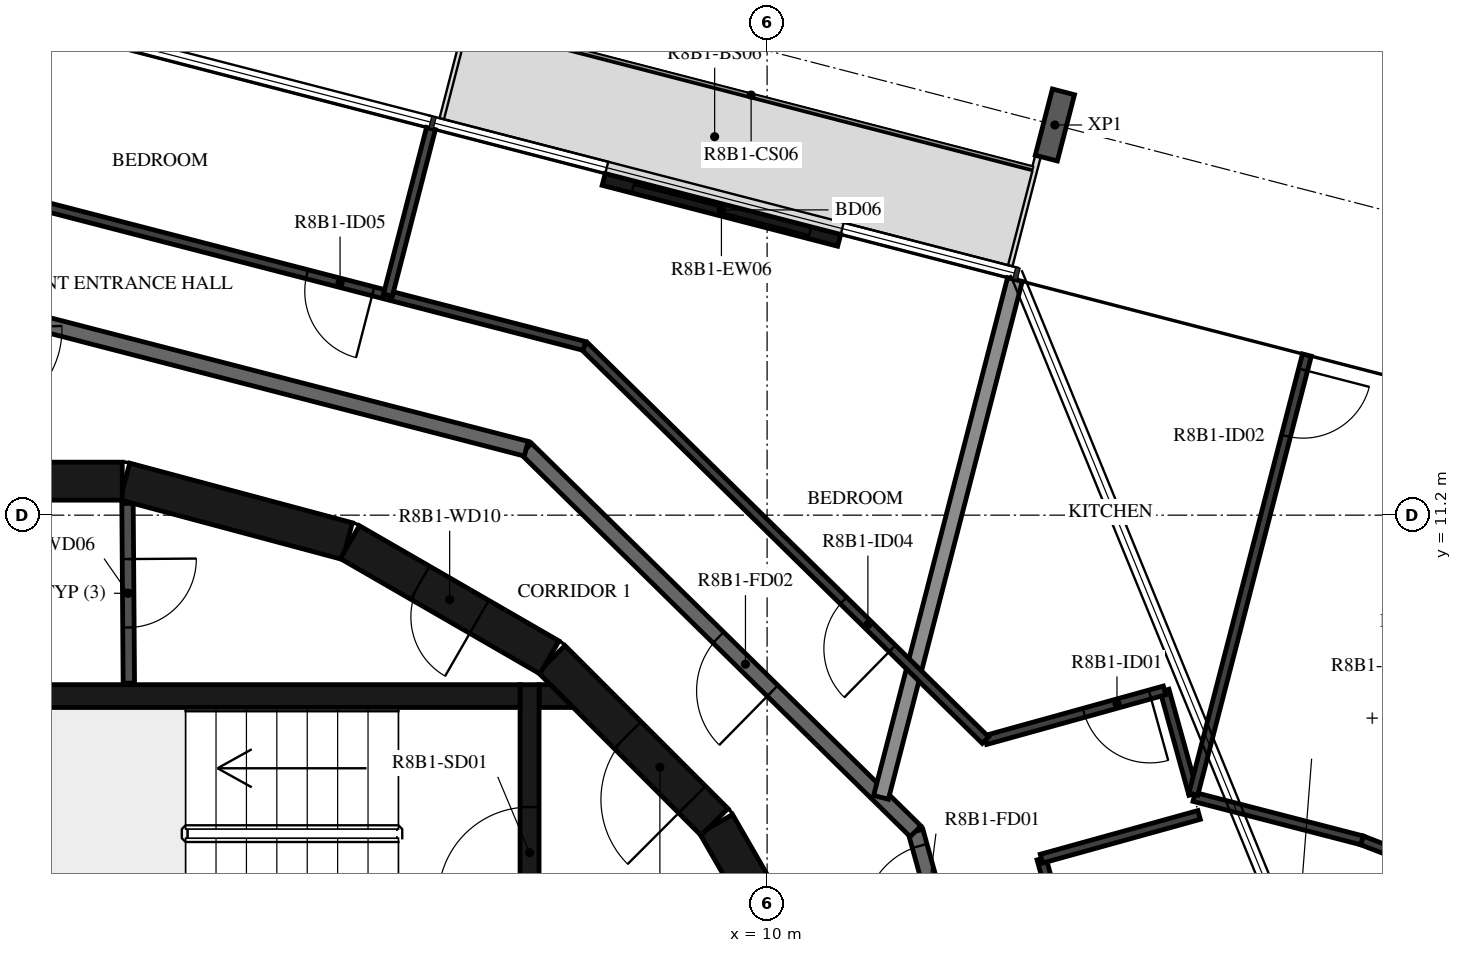
"""IFC4 building model, lengths in metres.
Left out: names, types, materials, properties, quantities, classifications, styles, units other than length and angle.
Written with IfcOpenShell. Run it as: python <this file> out.ifc"""

import sys

from ifc_helpers import new_model, si_unit, direction, frame, frame_2d, origin, origin_2d, place, context, subcontext, project, spatial, polyline, rectangle, i_section, outline, extrude, element, fill, save


model = new_model("IFC4")
c1 = context("Model", 3, precision=1e-05, world=origin(), true_north=direction((0.0, 1.0)))
c2 = subcontext(c1, "Body", "Model", "MODEL_VIEW")
j1 = project(units=[si_unit("LENGTHUNIT", "METRE"), si_unit("PLANEANGLEUNIT", "RADIAN")], contexts=[c1])
p1 = place(None, origin())
s1 = spatial("IfcSite", under=j1, at=p1, CompositionType="ELEMENT")
p2 = place(p1, origin())
s2 = spatial("IfcBuilding", under=s1, at=p2, CompositionType="ELEMENT")
p3 = place(p2, frame((0.0, 0.0, 308.7)))
s3 = spatial("IfcBuildingStorey", under=s2, at=p3, CompositionType="ELEMENT", Elevation=308.7)
p4 = place(p3, frame((13.786, 16.333, -0.38), z_axis=(0.0, 0.0, 1.0), x_axis=(0.968147663906, -0.250379913079, 0.0)))
e1 = element("IfcColumn", 1, at=p4, inside=s3, PredefinedType="COLUMN", context=c2, shape_type="SweptSolid", body=[
    extrude(i_section(OverallWidth=0.3, OverallDepth=0.9, WebThickness=0.019, FlangeThickness=0.035, FilletRadius=0.03, at=origin_2d()), origin(), (0.0, 0.0, 1.0), 3.5),
])
p5 = place(p3, frame((10.948, 14.815, 0.0), z_axis=(0.0, 0.0, 1.0), x_axis=(-0.968144998439, 0.250390219454, 0.0)))
e2 = element("IfcWall", 2, at=p5, inside=s3, PredefinedType="STANDARD", context=c2, shape_type="SweptSolid", body=[
    extrude(rectangle(XDim=3.2, YDim=0.16, at=frame_2d((1.6, 0.0))), origin(), (0.0, 0.0, 1.0), 3.12),
])
p6 = place(p5, frame((0.4, 0.0, 0.0)))
e3 = element("IfcOpeningElement", 3, at=p6, cuts=e2, PredefinedType="OPENING", context=c2, shape_type="SweptSolid", body=[
    extrude(rectangle(XDim=2.4, YDim=2.4, at=frame_2d((1.2, 1.2))), frame((0.0, 0.09, 0.0), z_axis=(0.0, -1.0, 0.0), x_axis=(1.0, 0.0, 0.0)), (0.0, 0.0, 1.0), 0.18),
])
p7 = place(p3, frame((10.845, 4.51, 0.0), z_axis=(0.0, 0.0, 1.0), x_axis=(-0.500087131594, 0.865975092491, 0.0)))
e4 = element("IfcWall", 4, at=p7, inside=s3, PredefinedType="SHEAR", context=c2, shape_type="SweptSolid", body=[
    extrude(rectangle(XDim=3.033, YDim=0.5, at=frame_2d((1.516, 0.0))), origin(), (0.0, 0.0, 1.0), 3.12),
])
p8 = place(p3, frame((9.308, 7.164, 0.0), z_axis=(0.0, 0.0, 1.0), x_axis=(-0.707106781187, 0.707106781187, 0.0)))
e5 = element("IfcWall", 5, at=p8, inside=s3, PredefinedType="SHEAR", context=c2, shape_type="SweptSolid", body=[
    extrude(rectangle(XDim=3.032, YDim=0.5, at=frame_2d((1.516, 0.0))), origin(), (0.0, 0.0, 1.0), 3.12),
])
p9 = place(p8, frame((0.416, 0.0, 0.0)))
e6 = element("IfcOpeningElement", 6, at=p9, cuts=e5, PredefinedType="OPENING", context=c2, shape_type="SweptSolid", body=[
    extrude(rectangle(XDim=1.2, YDim=2.1, at=frame_2d((0.6, 1.05))), frame((0.0, 0.26, 0.0), z_axis=(0.0, -1.0, 0.0), x_axis=(1.0, 0.0, 0.0)), (0.0, 0.0, 1.0), 0.52),
])
p10 = place(p3, frame((7.137, 9.329, 0.0), z_axis=(0.0, 0.0, 1.0), x_axis=(-0.865975092491, 0.500087131594, 0.0)))
e7 = element("IfcWall", 7, at=p10, inside=s3, PredefinedType="SHEAR", context=c2, shape_type="SweptSolid", body=[
    extrude(rectangle(XDim=3.033, YDim=0.5, at=frame_2d((1.516, 0.0))), origin(), (0.0, 0.0, 1.0), 3.12),
])
p11 = place(p10, frame((1.066, 0.0, 0.0)))
e8 = element("IfcOpeningElement", 8, at=p11, cuts=e7, PredefinedType="OPENING", context=c2, shape_type="SweptSolid", body=[
    extrude(rectangle(XDim=0.9, YDim=2.1, at=frame_2d((0.45, 1.05))), frame((0.0, 0.26, 0.0), z_axis=(0.0, -1.0, 0.0), x_axis=(1.0, 0.0, 0.0)), (0.0, 0.0, 1.0), 0.52),
])
for number, where, z_axis, x_axis in (
    (9, (4.479, 10.858, 0.0), (0.0, 0.0, 1.0), (-0.966, 0.259, 0.0)),
    (10, (1.516, 11.647, 0.0), (0.0, 0.0, 1.0), (-1.0, 0.0, 0.0)),
):
    element("IfcWall", number, at=place(p3, frame(where, z_axis=z_axis, x_axis=x_axis)), inside=s3, PredefinedType="SHEAR", context=c2, shape_type="SweptSolid", body=[
        extrude(rectangle(XDim=3.033, YDim=0.5, at=frame_2d((1.516, 0.0))), origin(), (0.0, 0.0, 1.0), 3.12),
    ])
p12 = place(p3, frame((0.0, 8.82, 0.0), z_axis=(0.0, 0.0, 1.0), x_axis=(1.0, 0.0, 0.0)))
e11 = element("IfcWall", 11, at=p12, inside=s3, PredefinedType="SHEAR", context=c2, shape_type="SweptSolid", body=[
    extrude(rectangle(XDim=6.75, YDim=0.3, at=frame_2d((3.375, 0.0))), origin(), (0.0, 0.0, 1.0), 3.12),
])
p13 = place(p3, frame((6.875, 5.05, 0.0), z_axis=(0.0, 0.0, 1.0), x_axis=(0.0, 1.0, 0.0)))
e12 = element("IfcWall", 12, at=p13, inside=s3, PredefinedType="SHEAR", context=c2, shape_type="SweptSolid", body=[
    extrude(rectangle(XDim=3.92, YDim=0.25, at=frame_2d((1.96, 0.0))), origin(), (0.0, 0.0, 1.0), 3.12),
])
p14 = place(p13, frame((1.11, 0.0, 0.0)))
e13 = element("IfcOpeningElement", 13, at=p14, cuts=e12, PredefinedType="OPENING", context=c2, shape_type="SweptSolid", body=[
    extrude(rectangle(XDim=1.2, YDim=2.1, at=frame_2d((0.6, 1.05))), frame((0.0, 0.135, 0.0), z_axis=(0.0, -1.0, 0.0), x_axis=(1.0, 0.0, 0.0)), (0.0, 0.0, 1.0), 0.27),
])
p15 = place(p3, origin())
e14 = element("IfcWall", 14, at=p15, inside=s3, PredefinedType="SHEAR", context=c2, shape_type="SweptSolid", body=[
    extrude(outline(polyline([(7.448, 8.67), (7.0, 8.67), (7.0, 8.97), (7.148, 8.97), (7.448, 8.67)])), origin(), (0.0, 0.0, 1.0), 3.12),
])
p16 = place(p3, frame((1.586, 11.354, 0.0), z_axis=(0.0, 0.0, 1.0), x_axis=(0.007227482881, -0.999973881405, 0.0)))
e15 = element("IfcWall", 15, at=p16, inside=s3, PredefinedType="PARTITIONING", context=c2, shape_type="SweptSolid", body=[
    extrude(rectangle(XDim=2.365, YDim=0.15, at=frame_2d((1.182, 0.0))), origin(), (0.0, 0.0, 1.0), 3.12),
])
p17 = place(p16, frame((0.732, 0.0, 0.0)))
e16 = element("IfcOpeningElement", 16, at=p17, cuts=e15, PredefinedType="OPENING", context=c2, shape_type="SweptSolid", body=[
    extrude(rectangle(XDim=0.9, YDim=2.1, at=frame_2d((0.45, 1.05))), frame((0.0, 0.085, 0.0), z_axis=(0.0, -1.0, 0.0), x_axis=(1.0, 0.0, 0.0)), (0.0, 0.0, 1.0), 0.17),
])
p18 = place(p3, frame((12.913, 3.581, 0.0), z_axis=(0.0, 0.0, 1.0), x_axis=(-0.267223005422, 0.963634715737, 0.0)))
e17 = element("IfcWall", 17, at=p18, inside=s3, PredefinedType="STANDARD", context=c2, shape_type="SweptSolid", body=[
    extrude(rectangle(XDim=3.591, YDim=0.2, at=frame_2d((1.795, 0.0))), origin(), (0.0, 0.0, 1.0), 3.12),
])
p19 = place(p18, frame((2.39, 0.0, 0.0)))
e18 = element("IfcOpeningElement", 18, at=p19, cuts=e17, PredefinedType="OPENING", context=c2, shape_type="SweptSolid", body=[
    extrude(rectangle(XDim=1.0, YDim=2.1, at=frame_2d((0.5, 1.05))), frame((0.0, 0.11, 0.0), z_axis=(0.0, -1.0, 0.0), x_axis=(1.0, 0.0, 0.0)), (0.0, 0.0, 1.0), 0.22),
])
p20 = place(p3, frame((11.953, 7.041, 0.0), z_axis=(0.0, 0.0, 1.0), x_axis=(-0.713250549143, 0.70090916255, 0.0)))
e19 = element("IfcWall", 19, at=p20, inside=s3, PredefinedType="STANDARD", context=c2, shape_type="SweptSolid", body=[
    extrude(rectangle(XDim=7.181, YDim=0.2, at=frame_2d((3.59, 0.0))), origin(), (0.0, 0.0, 1.0), 3.12),
])
p21 = place(p20, frame((2.637, 0.0, 0.0)))
e20 = element("IfcOpeningElement", 20, at=p21, cuts=e19, PredefinedType="OPENING", context=c2, shape_type="SweptSolid", body=[
    extrude(rectangle(XDim=1.0, YDim=2.1, at=frame_2d((0.5, 1.05))), frame((0.0, 0.11, 0.0), z_axis=(0.0, -1.0, 0.0), x_axis=(1.0, 0.0, 0.0)), (0.0, 0.0, 1.0), 0.22),
])
p22 = place(p3, frame((6.831, 12.074, 0.0), z_axis=(0.0, 0.0, 1.0), x_axis=(-0.968144780225, 0.250391063186, 0.0)))
e21 = element("IfcWall", 21, at=p22, inside=s3, PredefinedType="STANDARD", context=c2, shape_type="SweptSolid", body=[
    extrude(rectangle(XDim=7.181, YDim=0.2, at=frame_2d((3.591, 0.0))), origin(), (0.0, 0.0, 1.0), 3.12),
])
p23 = place(p3, frame((13.26, 14.3, 0.0), z_axis=(0.0, 0.0, 1.0), x_axis=(-0.250397400042, -0.968143141303, 0.0)))
e22 = element("IfcWall", 22, at=p23, inside=s3, PredefinedType="STANDARD", context=c2, shape_type="SweptSolid", body=[
    extrude(rectangle(XDim=7.037, YDim=0.2, at=frame_2d((3.518, 0.0))), origin(), (0.0, 0.0, 1.0), 2.73),
])
p24 = place(p3, frame((14.358, 3.982, 0.0), z_axis=(0.0, 0.0, 1.0), x_axis=(-0.267275166053, 0.963620249689, 0.0)))
e23 = element("IfcWall", 23, at=p24, inside=s3, PredefinedType="PARTITIONING", context=c2, shape_type="SweptSolid", body=[
    extrude(rectangle(XDim=2.801, YDim=0.12, at=frame_2d((1.4, 0.0))), origin(), (0.0, 0.0, 1.0), 3.12),
])
p25 = place(p24, frame((0.2, 0.0, 0.0)))
e24 = element("IfcOpeningElement", 24, at=p25, cuts=e23, PredefinedType="OPENING", context=c2, shape_type="SweptSolid", body=[
    extrude(rectangle(XDim=0.8, YDim=2.1, at=frame_2d((0.4, 1.05))), frame((0.0, 0.07, 0.0), z_axis=(0.0, -1.0, 0.0), x_axis=(1.0, 0.0, 0.0)), (0.0, 0.0, 1.0), 0.14),
])
p26 = place(p3, frame((13.61, 6.681, 0.0), z_axis=(0.0, 0.0, 1.0), x_axis=(0.963626714087, 0.267251858551, 0.0)))
e25 = element("IfcWall", 25, at=p26, inside=s3, PredefinedType="PARTITIONING", context=c2, shape_type="SweptSolid", body=[
    extrude(rectangle(XDim=2.152, YDim=0.12, at=frame_2d((1.076, 0.0))), origin(), (0.0, 0.0, 1.0), 3.12),
])
p27 = place(p3, frame((15.608, 7.53, 0.0), z_axis=(0.0, 0.0, 1.0), x_axis=(-0.267172351994, 0.963648760872, 0.0)))
e26 = element("IfcWall", 26, at=p27, inside=s3, PredefinedType="PARTITIONING", context=c2, shape_type="SweptSolid", body=[
    extrude(rectangle(XDim=1.416, YDim=0.12, at=frame_2d((0.708, 0.0))), origin(), (0.0, 0.0, 1.0), 3.12),
])
p28 = place(p3, frame((15.229, 8.894, 0.0), z_axis=(0.0, 0.0, 1.0), x_axis=(-0.96363793677, -0.267211389759, 0.0)))
e27 = element("IfcWall", 27, at=p28, inside=s3, PredefinedType="PARTITIONING", context=c2, shape_type="SweptSolid", body=[
    extrude(rectangle(XDim=2.446, YDim=0.12, at=frame_2d((1.223, 0.0))), origin(), (0.0, 0.0, 1.0), 3.12),
])
p29 = place(p28, frame((0.2, 0.0, 0.0)))
e28 = element("IfcOpeningElement", 28, at=p29, cuts=e27, PredefinedType="OPENING", context=c2, shape_type="SweptSolid", body=[
    extrude(rectangle(XDim=0.9, YDim=2.1, at=frame_2d((0.45, 1.05))), frame((0.0, 0.07, 0.0), z_axis=(0.0, -1.0, 0.0), x_axis=(1.0, 0.0, 0.0)), (0.0, 0.0, 1.0), 0.14),
])
p30 = place(p3, frame((12.873, 8.24, 0.0), z_axis=(0.0, 0.0, 1.0), x_axis=(-0.713251042219, 0.700908660792, 0.0)))
e29 = element("IfcWall", 29, at=p30, inside=s3, PredefinedType="PARTITIONING", context=c2, shape_type="SweptSolid", body=[
    extrude(rectangle(XDim=7.398, YDim=0.12, at=frame_2d((3.699, 0.0))), origin(), (0.0, 0.0, 1.0), 3.12),
])
p31 = place(p30, frame((1.718, 0.0, 0.0)))
e30 = element("IfcOpeningElement", 30, at=p31, cuts=e29, PredefinedType="OPENING", context=c2, shape_type="SweptSolid", body=[
    extrude(rectangle(XDim=0.9, YDim=2.1, at=frame_2d((0.45, 1.05))), frame((0.0, 0.07, 0.0), z_axis=(0.0, -1.0, 0.0), x_axis=(1.0, 0.0, 0.0)), (0.0, 0.0, 1.0), 0.14),
])
p32 = place(p3, frame((18.577, 6.631, 0.0), z_axis=(0.0, 0.0, 1.0), x_axis=(-0.932531937323, 0.361087504455, 0.0)))
e31 = element("IfcWall", 31, at=p32, inside=s3, PredefinedType="PARTITIONING", context=c2, shape_type="SweptSolid", body=[
    extrude(rectangle(XDim=0.807, YDim=0.12, at=frame_2d((0.403, 0.0))), origin(), (0.0, 0.0, 1.0), 3.12),
])
p33 = place(p3, frame((17.825, 6.922, 0.0), z_axis=(0.0, 0.0, 1.0), x_axis=(-0.968151834511, 0.250363785985, 0.0)))
e32 = element("IfcWall", 32, at=p33, inside=s3, PredefinedType="PARTITIONING", context=c2, shape_type="SweptSolid", body=[
    extrude(rectangle(XDim=2.28, YDim=0.12, at=frame_2d((1.14, 0.0))), origin(), (0.0, 0.0, 1.0), 3.12),
])
p34 = place(p3, frame((17.102, 13.307, 0.0), z_axis=(0.0, 0.0, 1.0), x_axis=(-0.250374225748, -0.968149134731, 0.0)))
e33 = element("IfcWall", 33, at=p34, inside=s3, PredefinedType="PARTITIONING", context=c2, shape_type="SweptSolid", body=[
    extrude(rectangle(XDim=5.967, YDim=0.12, at=frame_2d((2.983, 0.0))), origin(), (0.0, 0.0, 1.0), 3.12),
])
p35 = place(p34, frame((0.2, 0.0, 0.0)))
e34 = element("IfcOpeningElement", 34, at=p35, cuts=e33, PredefinedType="OPENING", context=c2, shape_type="SweptSolid", body=[
    extrude(rectangle(XDim=0.9, YDim=2.1, at=frame_2d((0.45, 1.05))), frame((0.0, 0.07, 0.0), z_axis=(0.0, -1.0, 0.0), x_axis=(1.0, 0.0, 0.0)), (0.0, 0.0, 1.0), 0.14),
])
p36 = place(p3, frame((7.596, 13.426, 0.0), z_axis=(0.0, 0.0, 1.0), x_axis=(-0.968146656033, 0.250383810203, 0.0)))
e35 = element("IfcWall", 35, at=p36, inside=s3, PredefinedType="PARTITIONING", context=c2, shape_type="SweptSolid", body=[
    extrude(rectangle(XDim=7.985, YDim=0.12, at=frame_2d((3.992, 0.0))), origin(), (0.0, 0.0, 1.0), 3.12),
])
p37 = place(p36, frame((2.87, 0.0, 0.0)))
e36 = element("IfcOpeningElement", 36, at=p37, cuts=e35, PredefinedType="OPENING", context=c2, shape_type="SweptSolid", body=[
    extrude(rectangle(XDim=0.9, YDim=2.1, at=frame_2d((0.45, 1.05))), frame((0.0, 0.07, 0.0), z_axis=(0.0, -1.0, 0.0), x_axis=(1.0, 0.0, 0.0)), (0.0, 0.0, 1.0), 0.14),
])
p38 = place(p3, frame((5.578, 16.287, 0.0), z_axis=(0.0, 0.0, 1.0), x_axis=(-0.250415921279, -0.968138350841, 0.0)))
e37 = element("IfcWall", 37, at=p38, inside=s3, PredefinedType="PARTITIONING", context=c2, shape_type="SweptSolid", body=[
    extrude(rectangle(XDim=2.265, YDim=0.12, at=frame_2d((1.132, 0.0))), origin(), (0.0, 0.0, 1.0), 2.73),
])
p39 = place(p6, origin())
e38 = element("IfcDoor", 38, at=p39, inside=s3, OperationType="DOUBLE_DOOR_SLIDING", PredefinedType="DOOR", context=c2, shape_type="SweptSolid", body=[
    extrude(rectangle(XDim=2.4, YDim=2.4, at=frame_2d((1.2, 1.2))), frame((0.0, 0.025, 0.0), z_axis=(0.0, -1.0, 0.0), x_axis=(1.0, 0.0, 0.0)), (0.0, 0.0, 1.0), 0.05),
])
fill(e3, e38)
p40 = place(p14, origin())
e39 = element("IfcDoor", 39, at=p40, inside=s3, OperationType="SINGLE_SWING_LEFT", PredefinedType="DOOR", context=c2, shape_type="SweptSolid", body=[
    extrude(rectangle(XDim=1.2, YDim=2.1, at=frame_2d((0.6, 1.05))), frame((0.0, 0.025, 0.0), z_axis=(0.0, -1.0, 0.0), x_axis=(1.0, 0.0, 0.0)), (0.0, 0.0, 1.0), 0.05),
])
fill(e13, e39)
p41 = place(p9, origin())
e40 = element("IfcDoor", 40, at=p41, inside=s3, OperationType="SINGLE_SWING_RIGHT", PredefinedType="DOOR", context=c2, shape_type="SweptSolid", body=[
    extrude(rectangle(XDim=1.2, YDim=2.1, at=frame_2d((0.6, 1.05))), frame((0.0, 0.025, 0.0), z_axis=(0.0, -1.0, 0.0), x_axis=(1.0, 0.0, 0.0)), (0.0, 0.0, 1.0), 0.05),
])
fill(e6, e40)
p42 = place(p17, origin())
e41 = element("IfcDoor", 41, at=p42, inside=s3, OperationType="SINGLE_SWING_RIGHT", PredefinedType="DOOR", context=c2, shape_type="SweptSolid", body=[
    extrude(rectangle(XDim=0.9, YDim=2.1, at=frame_2d((0.45, 1.05))), frame((0.0, 0.025, 0.0), z_axis=(0.0, -1.0, 0.0), x_axis=(1.0, 0.0, 0.0)), (0.0, 0.0, 1.0), 0.05),
])
fill(e16, e41)
p43 = place(p11, origin())
e42 = element("IfcDoor", 42, at=p43, inside=s3, OperationType="SINGLE_SWING_RIGHT", PredefinedType="DOOR", context=c2, shape_type="SweptSolid", body=[
    extrude(rectangle(XDim=0.9, YDim=2.1, at=frame_2d((0.45, 1.05))), frame((0.0, 0.025, 0.0), z_axis=(0.0, -1.0, 0.0), x_axis=(1.0, 0.0, 0.0)), (0.0, 0.0, 1.0), 0.05),
])
fill(e8, e42)
p44 = place(p19, origin())
e43 = element("IfcDoor", 43, at=p44, inside=s3, OperationType="SINGLE_SWING_LEFT", PredefinedType="DOOR", context=c2, shape_type="SweptSolid", body=[
    extrude(rectangle(XDim=1.0, YDim=2.1, at=frame_2d((0.5, 1.05))), frame((0.0, 0.025, 0.0), z_axis=(0.0, -1.0, 0.0), x_axis=(1.0, 0.0, 0.0)), (0.0, 0.0, 1.0), 0.05),
])
fill(e18, e43)
p45 = place(p29, origin())
e44 = element("IfcDoor", 44, at=p45, inside=s3, OperationType="SINGLE_SWING_LEFT", PredefinedType="DOOR", context=c2, shape_type="SweptSolid", body=[
    extrude(rectangle(XDim=0.9, YDim=2.1, at=frame_2d((0.45, 1.05))), frame((0.0, 0.025, 0.0), z_axis=(0.0, -1.0, 0.0), x_axis=(1.0, 0.0, 0.0)), (0.0, 0.0, 1.0), 0.05),
])
fill(e28, e44)
p46 = place(p35, origin())
e45 = element("IfcDoor", 45, at=p46, inside=s3, OperationType="SINGLE_SWING_LEFT", PredefinedType="DOOR", context=c2, shape_type="SweptSolid", body=[
    extrude(rectangle(XDim=0.9, YDim=2.1, at=frame_2d((0.45, 1.05))), frame((0.0, 0.025, 0.0), z_axis=(0.0, -1.0, 0.0), x_axis=(1.0, 0.0, 0.0)), (0.0, 0.0, 1.0), 0.05),
])
fill(e34, e45)
p47 = place(p21, origin())
e46 = element("IfcDoor", 46, at=p47, inside=s3, OperationType="SINGLE_SWING_LEFT", PredefinedType="DOOR", context=c2, shape_type="SweptSolid", body=[
    extrude(rectangle(XDim=1.0, YDim=2.1, at=frame_2d((0.5, 1.05))), frame((0.0, 0.025, 0.0), z_axis=(0.0, -1.0, 0.0), x_axis=(1.0, 0.0, 0.0)), (0.0, 0.0, 1.0), 0.05),
])
fill(e20, e46)
p48 = place(p31, origin())
e47 = element("IfcDoor", 47, at=p48, inside=s3, OperationType="SINGLE_SWING_LEFT", PredefinedType="DOOR", context=c2, shape_type="SweptSolid", body=[
    extrude(rectangle(XDim=0.9, YDim=2.1, at=frame_2d((0.45, 1.05))), frame((0.0, 0.025, 0.0), z_axis=(0.0, -1.0, 0.0), x_axis=(1.0, 0.0, 0.0)), (0.0, 0.0, 1.0), 0.05),
])
fill(e30, e47)
p49 = place(p37, origin())
e48 = element("IfcDoor", 48, at=p49, inside=s3, OperationType="SINGLE_SWING_LEFT", PredefinedType="DOOR", context=c2, shape_type="SweptSolid", body=[
    extrude(rectangle(XDim=0.9, YDim=2.1, at=frame_2d((0.45, 1.05))), frame((0.0, 0.025, 0.0), z_axis=(0.0, -1.0, 0.0), x_axis=(1.0, 0.0, 0.0)), (0.0, 0.0, 1.0), 0.05),
])
fill(e36, e48)
save(model, sys.argv[1])
